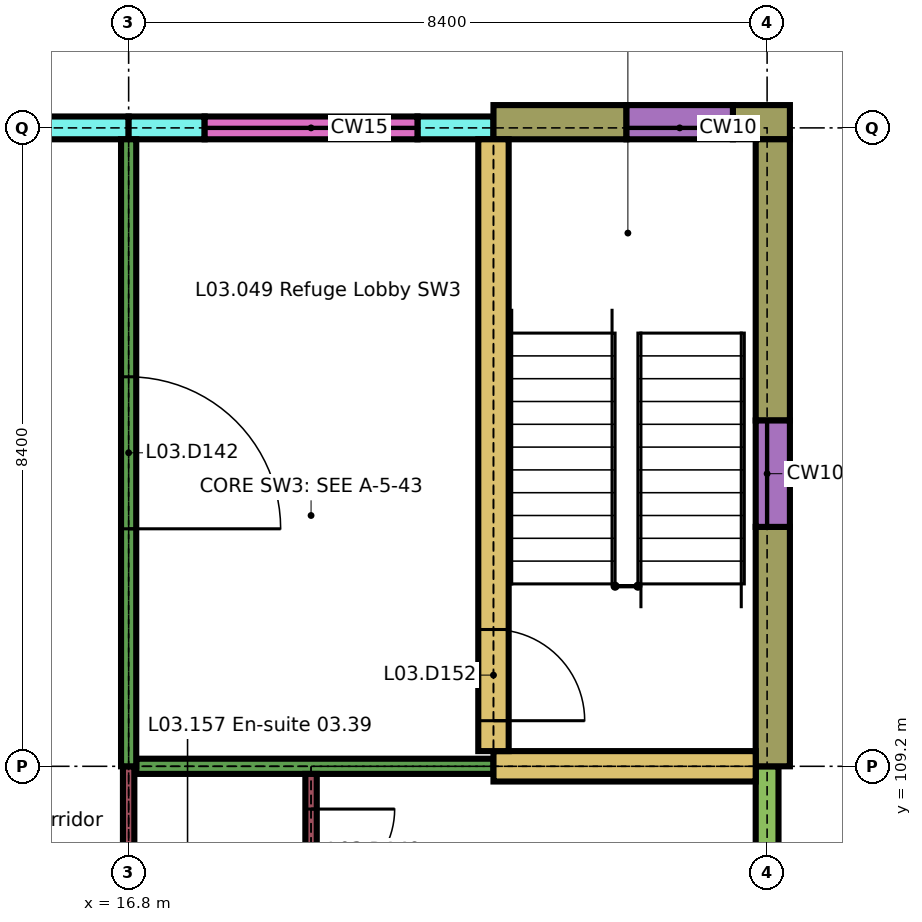
"""IFC4 building model, lengths in metres.
Left out: names, types, materials, properties, quantities, classifications, styles, units other than length and angle.
Written with IfcOpenShell. Run it as: python <this file> out.ifc"""

import sys

from ifc_helpers import new_model, si_unit, direction, frame, frame_2d, origin, place, context, subcontext, project, spatial, rectangle, extrude, element, fill, save


model = new_model("IFC4")
c1 = context("Model", 3, precision=1e-05, world=origin(), true_north=direction((0.0, 1.0)))
c2 = subcontext(c1, "Body", "Model", "MODEL_VIEW")
j1 = project(units=[si_unit("LENGTHUNIT", "METRE"), si_unit("PLANEANGLEUNIT", "RADIAN")], contexts=[c1])
p1 = place(None, origin())
s1 = spatial("IfcSite", under=j1, at=p1, CompositionType="ELEMENT")
p2 = place(p1, origin())
s2 = spatial("IfcBuilding", under=s1, at=p2, CompositionType="ELEMENT")
p3 = place(p2, frame((0.0, 0.0, 15.3)))
s3 = spatial("IfcBuildingStorey", under=s2, at=p3, CompositionType="ELEMENT", Elevation=15.3)
p4 = place(p3, frame((13.8, 117.6, 0.0), z_axis=(0.0, 0.0, 1.0), x_axis=(1.0, 0.0, 0.0)))
e1 = element("IfcWall", 1, at=p4, inside=s3, PredefinedType="SOLIDWALL", context=c2, shape_type="SweptSolid", body=[
    extrude(rectangle(XDim=3.0, YDim=0.3, at=frame_2d((1.5, 0.0))), origin(), (0.0, 0.0, 1.0), 3.26),
])
p5 = place(p4, frame((0.45, 0.0, 0.9)))
e2 = element("IfcOpeningElement", 2, at=p5, cuts=e1, PredefinedType="OPENING", context=c2, shape_type="SweptSolid", body=[
    extrude(rectangle(XDim=0.9, YDim=1.5, at=frame_2d((0.45, 0.75))), frame((0.0, 0.16, 0.0), z_axis=(0.0, -1.0, 0.0), x_axis=(1.0, 0.0, 0.0)), (0.0, 0.0, 1.0), 0.32),
])
for number, where, z_axis, x_axis in (
    (3, (16.8, 117.6, 0.0), (0.0, 0.0, 1.0), (1.0, 0.0, 0.0)),
    (4, (20.6, 117.6, 0.0), (0.0, 0.0, 1.0), (1.0, 0.0, 0.0)),
):
    element("IfcWall", number, at=place(p3, frame(where, z_axis=z_axis, x_axis=x_axis)), inside=s3, PredefinedType="SOLIDWALL", context=c2, shape_type="SweptSolid", body=[
        extrude(rectangle(XDim=1.0, YDim=0.3, at=frame_2d((0.5, 0.0))), origin(), (0.0, 0.0, 1.0), 3.26),
    ])
p6 = place(p3, frame((17.8, 117.6, 0.0), z_axis=(0.0, 0.0, 1.0), x_axis=(1.0, 0.0, 0.0)))
e5 = element("IfcWall", 5, at=p6, inside=s3, PredefinedType="SOLIDWALL", context=c2, shape_type="SweptSolid", body=[
    extrude(rectangle(XDim=2.8, YDim=0.3, at=frame_2d((1.4, 0.0))), origin(), (0.0, 0.0, 1.0), 0.6),
])
p7 = place(p3, frame((21.6, 117.675, 0.0), z_axis=(0.0, 0.0, 1.0), x_axis=(1.0, 0.0, 0.0)))
e6 = element("IfcWall", 6, at=p7, inside=s3, PredefinedType="SOLIDWALL", context=c2, shape_type="SweptSolid", body=[
    extrude(rectangle(XDim=1.75, YDim=0.45, at=frame_2d((0.875, 0.0))), origin(), (0.0, 0.0, 1.0), 3.26),
])
p8 = place(p3, frame((24.75, 117.675, 0.0), z_axis=(0.0, 0.0, 1.0), x_axis=(1.0, 0.0, 0.0)))
e7 = element("IfcWall", 7, at=p8, inside=s3, PredefinedType="SOLIDWALL", context=c2, shape_type="SweptSolid", body=[
    extrude(rectangle(XDim=0.75, YDim=0.45, at=frame_2d((0.375, 0.0))), origin(), (0.0, 0.0, 1.0), 3.26),
])
p9 = place(p3, frame((23.35, 117.675, 0.0), z_axis=(0.0, 0.0, 1.0), x_axis=(1.0, 0.0, 0.0)))
e8 = element("IfcWall", 8, at=p9, inside=s3, PredefinedType="SOLIDWALL", context=c2, shape_type="SweptSolid", body=[
    extrude(rectangle(XDim=1.4, YDim=0.45, at=frame_2d((0.7, 0.0))), origin(), (0.0, 0.0, 1.0), 0.6),
])
p10 = place(p3, frame((25.2, 105.0, 0.0), z_axis=(0.0, 0.0, 1.0), x_axis=(0.0, 1.0, 0.0)))
e9 = element("IfcWall", 9, at=p10, inside=s3, PredefinedType="SOLIDWALL", context=c2, shape_type="SweptSolid", body=[
    extrude(rectangle(XDim=4.2, YDim=0.3, at=frame_2d((2.1, 0.0))), origin(), (0.0, 0.0, 1.0), 2.96),
])
p11 = place(p10, frame((1.05, 0.0, 0.9)))
e10 = element("IfcOpeningElement", 10, at=p11, cuts=e9, PredefinedType="OPENING", context=c2, shape_type="SweptSolid", body=[
    extrude(rectangle(XDim=2.1, YDim=1.5, at=frame_2d((1.05, 0.75))), frame((0.0, 0.16, 0.0), z_axis=(0.0, -1.0, 0.0), x_axis=(1.0, 0.0, 0.0)), (0.0, 0.0, 1.0), 0.32),
])
p12 = place(p3, frame((25.275, 109.2, 0.0), z_axis=(0.0, 0.0, 1.0), x_axis=(0.0, 1.0, 0.0)))
e11 = element("IfcWall", 11, at=p12, inside=s3, PredefinedType="SOLIDWALL", context=c2, shape_type="SweptSolid", body=[
    extrude(rectangle(XDim=3.15, YDim=0.45, at=frame_2d((1.575, 0.0))), origin(), (0.0, 0.0, 1.0), 3.26),
])
p13 = place(p3, frame((25.275, 113.75, 0.0), z_axis=(0.0, 0.0, 1.0), x_axis=(0.0, 1.0, 0.0)))
e12 = element("IfcWall", 12, at=p13, inside=s3, PredefinedType="SOLIDWALL", context=c2, shape_type="SweptSolid", body=[
    extrude(rectangle(XDim=3.7, YDim=0.45, at=frame_2d((1.85, 0.0))), origin(), (0.0, 0.0, 1.0), 3.26),
])
p14 = place(p3, frame((25.275, 112.35, 0.0), z_axis=(0.0, 0.0, 1.0), x_axis=(0.0, 1.0, 0.0)))
e13 = element("IfcWall", 13, at=p14, inside=s3, PredefinedType="SOLIDWALL", context=c2, shape_type="SweptSolid", body=[
    extrude(rectangle(XDim=1.4, YDim=0.45, at=frame_2d((0.7, 0.0))), origin(), (0.0, 0.0, 1.0), 0.6),
])
p15 = place(p3, frame((16.9, 109.2, 0.0), z_axis=(0.0, 0.0, 1.0), x_axis=(1.0, 0.0, 0.0)))
e14 = element("IfcWall", 14, at=p15, inside=s3, PredefinedType="PARTITIONING", context=c2, shape_type="SweptSolid", body=[
    extrude(rectangle(XDim=4.7, YDim=0.2, at=frame_2d((2.35, 0.0))), origin(), (0.0, 0.0, 1.0), 3.26),
])
p16 = place(p3, frame((21.6, 109.2, 0.0), z_axis=(0.0, 0.0, 1.0), x_axis=(1.0, 0.0, 0.0)))
e15 = element("IfcWall", 15, at=p16, inside=s3, PredefinedType="SHEAR", context=c2, shape_type="SweptSolid", body=[
    extrude(rectangle(XDim=3.45, YDim=0.4, at=frame_2d((1.725, 0.0))), origin(), (0.0, 0.0, 1.0), 3.26),
])
p17 = place(p3, frame((16.8, 105.075, 0.0), z_axis=(0.0, 0.0, 1.0), x_axis=(0.0, 1.0, 0.0)))
e16 = element("IfcWall", 16, at=p17, inside=s3, PredefinedType="PARTITIONING", context=c2, shape_type="SweptSolid", body=[
    extrude(rectangle(XDim=4.125, YDim=0.15, at=frame_2d((2.062, 0.0))), origin(), (0.0, 0.0, 1.0), 3.26),
])
p18 = place(p17, frame((0.212, 0.0, 0.0)))
e17 = element("IfcOpeningElement", 17, at=p18, cuts=e16, PredefinedType="OPENING", context=c2, shape_type="SweptSolid", body=[
    extrude(rectangle(XDim=1.5, YDim=2.4, at=frame_2d((0.75, 1.2))), frame((0.0, 0.085, 0.0), z_axis=(0.0, -1.0, 0.0), x_axis=(1.0, 0.0, 0.0)), (0.0, 0.0, 1.0), 0.17),
])
p19 = place(p3, frame((16.8, 109.2, 0.0), z_axis=(0.0, 0.0, 1.0), x_axis=(0.0, 1.0, 0.0)))
e18 = element("IfcWall", 18, at=p19, inside=s3, PredefinedType="PARTITIONING", context=c2, shape_type="SweptSolid", body=[
    extrude(rectangle(XDim=8.25, YDim=0.2, at=frame_2d((4.125, 0.0))), origin(), (0.0, 0.0, 1.0), 3.26),
])
p20 = place(p19, frame((3.125, 0.0, 0.0)))
e19 = element("IfcOpeningElement", 19, at=p20, cuts=e18, PredefinedType="OPENING", context=c2, shape_type="SweptSolid", body=[
    extrude(rectangle(XDim=2.0, YDim=2.4, at=frame_2d((1.0, 1.2))), frame((0.0, 0.11, 0.0), z_axis=(0.0, -1.0, 0.0), x_axis=(1.0, 0.0, 0.0)), (0.0, 0.0, 1.0), 0.22),
])
p21 = place(p3, frame((19.2, 107.075, 0.0), z_axis=(0.0, 0.0, 1.0), x_axis=(0.0, 1.0, 0.0)))
e20 = element("IfcWall", 20, at=p21, inside=s3, PredefinedType="PARTITIONING", context=c2, shape_type="SweptSolid", body=[
    extrude(rectangle(XDim=2.025, YDim=0.15, at=frame_2d((1.013, 0.0))), origin(), (0.0, 0.0, 1.0), 3.26),
])
p22 = place(p21, frame((0.462, 0.0, 0.0)))
e21 = element("IfcOpeningElement", 21, at=p22, cuts=e20, PredefinedType="OPENING", context=c2, shape_type="SweptSolid", body=[
    extrude(rectangle(XDim=1.1, YDim=2.1, at=frame_2d((0.55, 1.05))), frame((0.0, 0.085, 0.0), z_axis=(0.0, -1.0, 0.0), x_axis=(1.0, 0.0, 0.0)), (0.0, 0.0, 1.0), 0.17),
])
p23 = place(p3, frame((21.6, 109.4, 0.0), z_axis=(0.0, 0.0, 1.0), x_axis=(0.0, 1.0, 0.0)))
e22 = element("IfcWall", 22, at=p23, inside=s3, PredefinedType="SHEAR", context=c2, shape_type="SweptSolid", body=[
    extrude(rectangle(XDim=8.05, YDim=0.4, at=frame_2d((4.025, 0.0))), origin(), (0.0, 0.0, 1.0), 3.26),
])
p24 = place(p23, frame((0.4, 0.0, 0.0)))
e23 = element("IfcOpeningElement", 23, at=p24, cuts=e22, PredefinedType="OPENING", context=c2, shape_type="SweptSolid", body=[
    extrude(rectangle(XDim=1.2, YDim=2.1, at=frame_2d((0.6, 1.05))), frame((0.0, 0.21, 0.0), z_axis=(0.0, -1.0, 0.0), x_axis=(1.0, 0.0, 0.0)), (0.0, 0.0, 1.0), 0.42),
])
p25 = place(p20, origin())
e24 = element("IfcDoor", 24, at=p25, inside=s3, OperationType="SINGLE_SWING_LEFT", PredefinedType="DOOR", context=c2, shape_type="SweptSolid", body=[
    extrude(rectangle(XDim=2.0, YDim=2.4, at=frame_2d((1.0, 1.2))), frame((0.0, 0.03, 0.0), z_axis=(0.0, -1.0, 0.0), x_axis=(1.0, 0.0, 0.0)), (0.0, 0.0, 1.0), 0.06),
])
fill(e19, e24)
p26 = place(p22, origin())
e25 = element("IfcDoor", 25, at=p26, inside=s3, OperationType="SINGLE_SWING_RIGHT", PredefinedType="DOOR", context=c2, shape_type="SweptSolid", body=[
    extrude(rectangle(XDim=1.1, YDim=2.1, at=frame_2d((0.55, 1.05))), frame((0.0, 0.025, 0.0), z_axis=(0.0, -1.0, 0.0), x_axis=(1.0, 0.0, 0.0)), (0.0, 0.0, 1.0), 0.05),
])
fill(e21, e25)
p27 = place(p24, origin())
e26 = element("IfcDoor", 26, at=p27, inside=s3, OperationType="SINGLE_SWING_LEFT", PredefinedType="DOOR", context=c2, shape_type="SweptSolid", body=[
    extrude(rectangle(XDim=1.2, YDim=2.1, at=frame_2d((0.6, 1.05))), frame((0.0, 0.025, 0.0), z_axis=(0.0, -1.0, 0.0), x_axis=(1.0, 0.0, 0.0)), (0.0, 0.0, 1.0), 0.05),
])
fill(e23, e26)
save(model, sys.argv[1])
